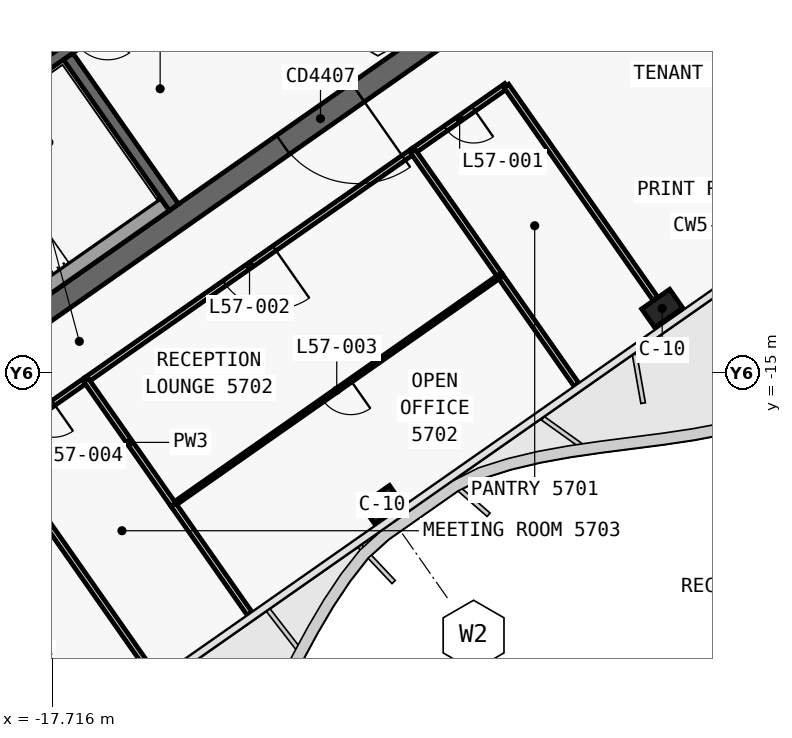
"""IFC4 building model, lengths in metres.
Left out: names, types, materials, properties, quantities, classifications, styles, units other than length and angle.
Written with IfcOpenShell. Run it as: python <this file> out.ifc"""

import sys

from ifc_helpers import new_model, si_unit, direction, frame, frame_2d, origin, origin_2d, place, context, subcontext, project, spatial, polyline, rectangle, outline, extrude, element, fill, save


model = new_model("IFC4")
c1 = context("Model", 3, precision=1e-05, world=origin(), true_north=direction((0.0, 1.0)))
c2 = subcontext(c1, "Body", "Model", "MODEL_VIEW")
j1 = project(units=[si_unit("LENGTHUNIT", "METRE"), si_unit("PLANEANGLEUNIT", "RADIAN")], contexts=[c1])
p1 = place(None, origin())
s1 = spatial("IfcSite", under=j1, at=p1, CompositionType="ELEMENT")
p2 = place(p1, origin())
s2 = spatial("IfcBuilding", under=s1, at=p2, CompositionType="ELEMENT")
p3 = place(p2, frame((0.0, 0.0, 244.9)))
s3 = spatial("IfcBuildingStorey", under=s2, at=p3, CompositionType="ELEMENT", Elevation=244.9)
p4 = place(p3, frame((-0.028, 12.066, 0.0), z_axis=(0.0, 0.0, 1.0), x_axis=(-0.819151382952, -0.573577380837, 0.0)))
e1 = element("IfcWall", 1, at=p4, inside=s3, PredefinedType="SHEAR", context=c2, shape_type="SweptSolid", body=[
    extrude(outline(polyline([(33.898, 0.3), (0.42, 0.3), (0.0, -0.3), (33.898, -0.3), (33.898, 0.3)])), origin(), (0.0, 0.0, 1.0), 3.9),
])
p5 = place(p3, frame((-0.028, -0.874, 0.0), z_axis=(0.0, 0.0, 1.0), x_axis=(-0.819150035022, -0.573579305871, 0.0)))
e2 = element("IfcWall", 2, at=p5, inside=s3, PredefinedType="SHEAR", context=c2, shape_type="SweptSolid", body=[
    extrude(outline(polyline([(26.476, 0.3), (0.42, 0.3), (0.0, -0.3), (26.476, -0.3), (26.476, 0.3)])), origin(), (0.0, 0.0, 1.0), 3.9),
])
p6 = place(p5, frame((2.976, 0.0, 0.0)))
e3 = element("IfcOpeningElement", 3, at=p6, cuts=e2, PredefinedType="OPENING", context=c2, shape_type="SweptSolid", body=[
    extrude(rectangle(XDim=2.4, YDim=2.1, at=frame_2d((1.2, 1.05))), frame((0.0, 0.31, 0.0), z_axis=(0.0, -1.0, 0.0), x_axis=(1.0, 0.0, 0.0)), (0.0, 0.0, 1.0), 0.62),
])
p7 = place(p5, frame((11.776, 0.0, 0.0)))
e4 = element("IfcOpeningElement", 4, at=p7, cuts=e2, PredefinedType="OPENING", context=c2, shape_type="SweptSolid", body=[
    extrude(rectangle(XDim=2.4, YDim=2.1, at=frame_2d((1.2, 1.05))), frame((0.0, 0.31, 0.0), z_axis=(0.0, -1.0, 0.0), x_axis=(1.0, 0.0, 0.0)), (0.0, 0.0, 1.0), 0.62),
])
p8 = place(p3, frame((-14.515, -10.652, 0.0), z_axis=(0.0, 0.0, 1.0), x_axis=(-0.573560315113, 0.819163332265, 0.0)))
e5 = element("IfcWall", 5, at=p8, inside=s3, PredefinedType="SHEAR", context=c2, shape_type="SweptSolid", body=[
    extrude(outline(polyline([(4.85, 0.15), (0.0, 0.15), (0.0, -0.15), (4.85, -0.15), (4.85, 0.15)])), origin(), (0.0, 0.0, 1.0), 3.9),
])
p9 = place(p3, frame((-2.638, 3.768, 0.0), z_axis=(0.0, 0.0, 1.0), x_axis=(-0.819155014212, -0.573572194837, 0.0)))
e6 = element("IfcWall", 6, at=p9, inside=s3, PredefinedType="SHEAR", context=c2, shape_type="SweptSolid", body=[
    extrude(outline(polyline([(26.4, 0.15), (0.0, 0.15), (0.0, -0.15), (26.4, -0.15), (26.4, 0.15)])), origin(), (0.0, 0.0, 1.0), 3.9),
])
p10 = place(p9, frame((1.169, 0.0, 0.0)))
e7 = element("IfcOpeningElement", 7, at=p10, cuts=e6, PredefinedType="OPENING", context=c2, shape_type="SweptSolid", body=[
    extrude(rectangle(XDim=1.1, YDim=2.1, at=frame_2d((0.55, 1.05))), frame((0.0, 0.16, 0.0), z_axis=(0.0, -1.0, 0.0), x_axis=(1.0, 0.0, 0.0)), (0.0, 0.0, 1.0), 0.32),
])
p11 = place(p9, frame((3.206, 0.0, 0.0)))
e8 = element("IfcOpeningElement", 8, at=p11, cuts=e6, PredefinedType="OPENING", context=c2, shape_type="SweptSolid", body=[
    extrude(rectangle(XDim=1.1, YDim=2.1, at=frame_2d((0.55, 1.05))), frame((0.0, 0.16, 0.0), z_axis=(0.0, -1.0, 0.0), x_axis=(1.0, 0.0, 0.0)), (0.0, 0.0, 1.0), 0.32),
])
p12 = place(p9, frame((5.244, 0.0, 0.0)))
e9 = element("IfcOpeningElement", 9, at=p12, cuts=e6, PredefinedType="OPENING", context=c2, shape_type="SweptSolid", body=[
    extrude(rectangle(XDim=1.1, YDim=2.1, at=frame_2d((0.55, 1.05))), frame((0.0, 0.16, 0.0), z_axis=(0.0, -1.0, 0.0), x_axis=(1.0, 0.0, 0.0)), (0.0, 0.0, 1.0), 0.32),
])
p13 = place(p9, frame((7.281, 0.0, 0.0)))
e10 = element("IfcOpeningElement", 10, at=p13, cuts=e6, PredefinedType="OPENING", context=c2, shape_type="SweptSolid", body=[
    extrude(rectangle(XDim=1.1, YDim=2.1, at=frame_2d((0.55, 1.05))), frame((0.0, 0.16, 0.0), z_axis=(0.0, -1.0, 0.0), x_axis=(1.0, 0.0, 0.0)), (0.0, 0.0, 1.0), 0.32),
])
p14 = place(p9, frame((9.688, 0.0, 0.0)))
e11 = element("IfcOpeningElement", 11, at=p14, cuts=e6, PredefinedType="OPENING", context=c2, shape_type="SweptSolid", body=[
    extrude(rectangle(XDim=1.1, YDim=2.1, at=frame_2d((0.55, 1.05))), frame((0.0, 0.16, 0.0), z_axis=(0.0, -1.0, 0.0), x_axis=(1.0, 0.0, 0.0)), (0.0, 0.0, 1.0), 0.32),
])
p15 = place(p9, frame((11.863, 0.0, 0.0)))
e12 = element("IfcOpeningElement", 12, at=p15, cuts=e6, PredefinedType="OPENING", context=c2, shape_type="SweptSolid", body=[
    extrude(rectangle(XDim=1.1, YDim=2.1, at=frame_2d((0.55, 1.05))), frame((0.0, 0.16, 0.0), z_axis=(0.0, -1.0, 0.0), x_axis=(1.0, 0.0, 0.0)), (0.0, 0.0, 1.0), 0.32),
])
p16 = place(p9, frame((14.552, 0.0, 0.0)))
e13 = element("IfcOpeningElement", 13, at=p16, cuts=e6, PredefinedType="OPENING", context=c2, shape_type="SweptSolid", body=[
    extrude(rectangle(XDim=1.0, YDim=2.1, at=frame_2d((0.5, 1.05))), frame((0.0, 0.16, 0.0), z_axis=(0.0, -1.0, 0.0), x_axis=(1.0, 0.0, 0.0)), (0.0, 0.0, 1.0), 0.32),
])
p17 = place(p9, frame((16.627, 0.0, 0.0)))
e14 = element("IfcOpeningElement", 14, at=p17, cuts=e6, PredefinedType="OPENING", context=c2, shape_type="SweptSolid", body=[
    extrude(rectangle(XDim=1.0, YDim=2.1, at=frame_2d((0.5, 1.05))), frame((0.0, 0.16, 0.0), z_axis=(0.0, -1.0, 0.0), x_axis=(1.0, 0.0, 0.0)), (0.0, 0.0, 1.0), 0.32),
])
for number, where, z_axis, x_axis in (
    (15, (-1.665, -13.313, 0.0), (0.0, 0.0, 1.0), (-0.819, -0.574, 0.0)),
    (16, (-9.038, -18.475, 0.0), (0.0, 0.0, 1.0), (-0.819, -0.574, 0.0)),
):
    element("IfcColumn", number, at=place(p3, frame(where, z_axis=z_axis, x_axis=x_axis)), inside=s3, PredefinedType="COLUMN", context=c2, shape_type="SweptSolid", body=[
        extrude(rectangle(XDim=0.9, YDim=0.6, at=origin_2d()), origin(), (0.0, 0.0, 1.0), 3.9),
    ])
p18 = place(p3, frame((-14.753, -10.574, 0.0), z_axis=(0.0, 0.0, 1.0), x_axis=(-0.819158229677, -0.573567602601, 0.0)))
e17 = element("IfcWall", 17, at=p18, inside=s3, PredefinedType="SOLIDWALL", context=c2, shape_type="SweptSolid", body=[
    extrude(rectangle(XDim=8.25, YDim=0.4, at=frame_2d((4.125, 0.0))), origin(), (0.0, 0.0, 1.0), 3.62),
])
p19 = place(p3, frame((-5.766, -7.456, 0.0), z_axis=(0.0, 0.0, 1.0), x_axis=(-0.81915932427, -0.57356603932, 0.0)))
e18 = element("IfcWall", 18, at=p19, inside=s3, PredefinedType="PARTITIONING", context=c2, shape_type="SweptSolid", body=[
    extrude(rectangle(XDim=3.002, YDim=0.15, at=frame_2d((1.501, 0.0))), origin(), (0.0, 0.0, 1.0), 3.05),
])
p20 = place(p19, frame((1.051, 0.0, 0.0)))
e19 = element("IfcOpeningElement", 19, at=p20, cuts=e18, PredefinedType="OPENING", context=c2, shape_type="SweptSolid", body=[
    extrude(rectangle(XDim=0.9, YDim=2.1, at=frame_2d((0.45, 1.05))), frame((0.0, 0.085, 0.0), z_axis=(0.0, -1.0, 0.0), x_axis=(1.0, 0.0, 0.0)), (0.0, 0.0, 1.0), 0.17),
])
p21 = place(p3, frame((-8.222, -9.175, 0.0), z_axis=(0.0, 0.0, 1.0), x_axis=(-0.81915329441, -0.573574650989, 0.0)))
e20 = element("IfcWall", 20, at=p21, inside=s3, PredefinedType="PARTITIONING", context=c2, shape_type="SweptSolid", body=[
    extrude(rectangle(XDim=10.504, YDim=0.15, at=frame_2d((5.252, 0.0))), origin(), (0.0, 0.0, 1.0), 3.05),
])
p22 = place(p21, frame((4.452, 0.0, 0.0)))
e21 = element("IfcOpeningElement", 21, at=p22, cuts=e20, PredefinedType="OPENING", context=c2, shape_type="SweptSolid", body=[
    extrude(rectangle(XDim=1.6, YDim=2.1, at=frame_2d((0.8, 1.05))), frame((0.0, 0.085, 0.0), z_axis=(0.0, -1.0, 0.0), x_axis=(1.0, 0.0, 0.0)), (0.0, 0.0, 1.0), 0.17),
])
p23 = place(p3, frame((-16.823, -15.198, 0.0), z_axis=(0.0, 0.0, 1.0), x_axis=(-0.81916700466, -0.573555070134, 0.0)))
e22 = element("IfcWall", 22, at=p23, inside=s3, PredefinedType="PARTITIONING", context=c2, shape_type="SweptSolid", body=[
    extrude(rectangle(XDim=3.004, YDim=0.15, at=frame_2d((1.502, 0.0))), origin(), (0.0, 0.0, 1.0), 3.62),
])
p24 = place(p23, frame((1.052, 0.0, 0.0)))
e23 = element("IfcOpeningElement", 23, at=p24, cuts=e22, PredefinedType="OPENING", context=c2, shape_type="SweptSolid", body=[
    extrude(rectangle(XDim=0.9, YDim=2.1, at=frame_2d((0.45, 1.05))), frame((0.0, 0.085, 0.0), z_axis=(0.0, -1.0, 0.0), x_axis=(1.0, 0.0, 0.0)), (0.0, 0.0, 1.0), 0.17),
])
p25 = place(p3, frame((-1.849, -13.051, 0.0), z_axis=(0.0, 0.0, 1.0), x_axis=(-0.57357985571, 0.819149650018, 0.0)))
e24 = element("IfcWall", 24, at=p25, inside=s3, PredefinedType="PARTITIONING", context=c2, shape_type="SweptSolid", body=[
    extrude(rectangle(XDim=6.832, YDim=0.15, at=frame_2d((3.416, 0.0))), origin(), (0.0, 0.0, 1.0), 3.05),
])
p26 = place(p3, frame((-3.922, -15.32, 0.0), z_axis=(0.0, 0.0, 1.0), x_axis=(-0.573560622794, 0.819163116834, 0.0)))
e25 = element("IfcWall", 25, at=p26, inside=s3, PredefinedType="PARTITIONING", context=c2, shape_type="SweptSolid", body=[
    extrude(rectangle(XDim=3.501, YDim=0.15, at=frame_2d((1.75, 0.0))), origin(), (0.0, 0.0, 1.0), 3.0),
])
p27 = place(p3, frame((-5.928, -12.455, 0.0), z_axis=(0.0, 0.0, 1.0), x_axis=(-0.573560601885, 0.819163131473, 0.0)))
e26 = element("IfcWall", 26, at=p27, inside=s3, PredefinedType="PARTITIONING", context=c2, shape_type="SweptSolid", body=[
    extrude(rectangle(XDim=4.002, YDim=0.15, at=frame_2d((2.001, 0.0))), origin(), (0.0, 0.0, 1.0), 3.62),
])
p28 = place(p3, frame((-5.929, -12.454, 0.0), z_axis=(0.0, 0.0, 1.0), x_axis=(-0.819155448096, -0.573571575181, 0.0)))
e27 = element("IfcWall", 27, at=p28, inside=s3, PredefinedType="PARTITIONING", context=c2, shape_type="SweptSolid", body=[
    extrude(rectangle(XDim=10.5, YDim=0.1, at=frame_2d((5.25, 0.0))), origin(), (0.0, 0.0, 1.0), 3.05),
])
p29 = place(p28, frame((4.8, 0.0, 0.0)))
e28 = element("IfcOpeningElement", 28, at=p29, cuts=e27, PredefinedType="OPENING", context=c2, shape_type="SweptSolid", body=[
    extrude(rectangle(XDim=0.9, YDim=2.1, at=frame_2d((0.45, 1.05))), frame((0.0, 0.06, 0.0), z_axis=(0.0, -1.0, 0.0), x_axis=(1.0, 0.0, 0.0)), (0.0, 0.0, 1.0), 0.12),
])
p30 = place(p3, frame((-12.523, -21.343, 0.0), z_axis=(0.0, 0.0, 1.0), x_axis=(-0.573555999232, 0.819166354134, 0.0)))
e29 = element("IfcWall", 29, at=p30, inside=s3, PredefinedType="PARTITIONING", context=c2, shape_type="SweptSolid", body=[
    extrude(rectangle(XDim=3.499, YDim=0.15, at=frame_2d((1.75, 0.0))), origin(), (0.0, 0.0, 1.0), 3.0),
])
p31 = place(p3, frame((-14.531, -18.476, 0.0), z_axis=(0.0, 0.0, 1.0), x_axis=(-0.573626190743, 0.819117203636, 0.0)))
e30 = element("IfcWall", 30, at=p31, inside=s3, PredefinedType="PARTITIONING", context=c2, shape_type="SweptSolid", body=[
    extrude(rectangle(XDim=4.0, YDim=0.15, at=frame_2d((2.0, 0.0))), origin(), (0.0, 0.0, 1.0), 3.62),
])
p32 = place(p3, frame((-14.98, -23.063, 0.0), z_axis=(0.0, 0.0, 1.0), x_axis=(-0.573597787563, 0.819137093595, 0.0)))
e31 = element("IfcWall", 31, at=p32, inside=s3, PredefinedType="PARTITIONING", context=c2, shape_type="SweptSolid", body=[
    extrude(rectangle(XDim=7.5, YDim=0.15, at=frame_2d((3.75, 0.0))), origin(), (0.0, 0.0, 1.0), 3.0),
])
p33 = place(p7, origin())
e32 = element("IfcDoor", 32, at=p33, inside=s3, OperationType="DOUBLE_DOOR_SINGLE_SWING", PredefinedType="DOOR", context=c2, shape_type="SweptSolid", body=[
    extrude(rectangle(XDim=2.4, YDim=2.1, at=frame_2d((1.2, 1.05))), frame((0.0, 0.025, 0.0), z_axis=(0.0, -1.0, 0.0), x_axis=(1.0, 0.0, 0.0)), (0.0, 0.0, 1.0), 0.05),
])
fill(e4, e32)
p34 = place(p20, origin())
e33 = element("IfcDoor", 33, at=p34, inside=s3, OperationType="SINGLE_SWING_RIGHT", PredefinedType="DOOR", context=c2, shape_type="SweptSolid", body=[
    extrude(rectangle(XDim=0.9, YDim=2.1, at=frame_2d((0.45, 1.05))), frame((0.0, 0.025, 0.0), z_axis=(0.0, -1.0, 0.0), x_axis=(1.0, 0.0, 0.0)), (0.0, 0.0, 1.0), 0.05),
])
fill(e19, e33)
p35 = place(p22, origin())
e34 = element("IfcDoor", 34, at=p35, inside=s3, OperationType="DOUBLE_DOOR_SINGLE_SWING", PredefinedType="DOOR", context=c2, shape_type="SweptSolid", body=[
    extrude(rectangle(XDim=1.6, YDim=2.1, at=frame_2d((0.8, 1.05))), frame((0.0, 0.025, 0.0), z_axis=(0.0, -1.0, 0.0), x_axis=(1.0, 0.0, 0.0)), (0.0, 0.0, 1.0), 0.05),
])
fill(e21, e34)
p36 = place(p29, origin())
e35 = element("IfcDoor", 35, at=p36, inside=s3, OperationType="SINGLE_SWING_RIGHT", PredefinedType="DOOR", context=c2, shape_type="SweptSolid", body=[
    extrude(rectangle(XDim=0.9, YDim=2.1, at=frame_2d((0.45, 1.05))), frame((0.0, 0.025, 0.0), z_axis=(0.0, -1.0, 0.0), x_axis=(1.0, 0.0, 0.0)), (0.0, 0.0, 1.0), 0.05),
])
fill(e28, e35)
p37 = place(p24, origin())
e36 = element("IfcDoor", 36, at=p37, inside=s3, OperationType="SINGLE_SWING_LEFT", PredefinedType="DOOR", context=c2, shape_type="SweptSolid", body=[
    extrude(rectangle(XDim=0.9, YDim=2.1, at=frame_2d((0.45, 1.05))), frame((0.0, 0.025, 0.0), z_axis=(0.0, -1.0, 0.0), x_axis=(1.0, 0.0, 0.0)), (0.0, 0.0, 1.0), 0.05),
])
fill(e23, e36)
save(model, sys.argv[1])
